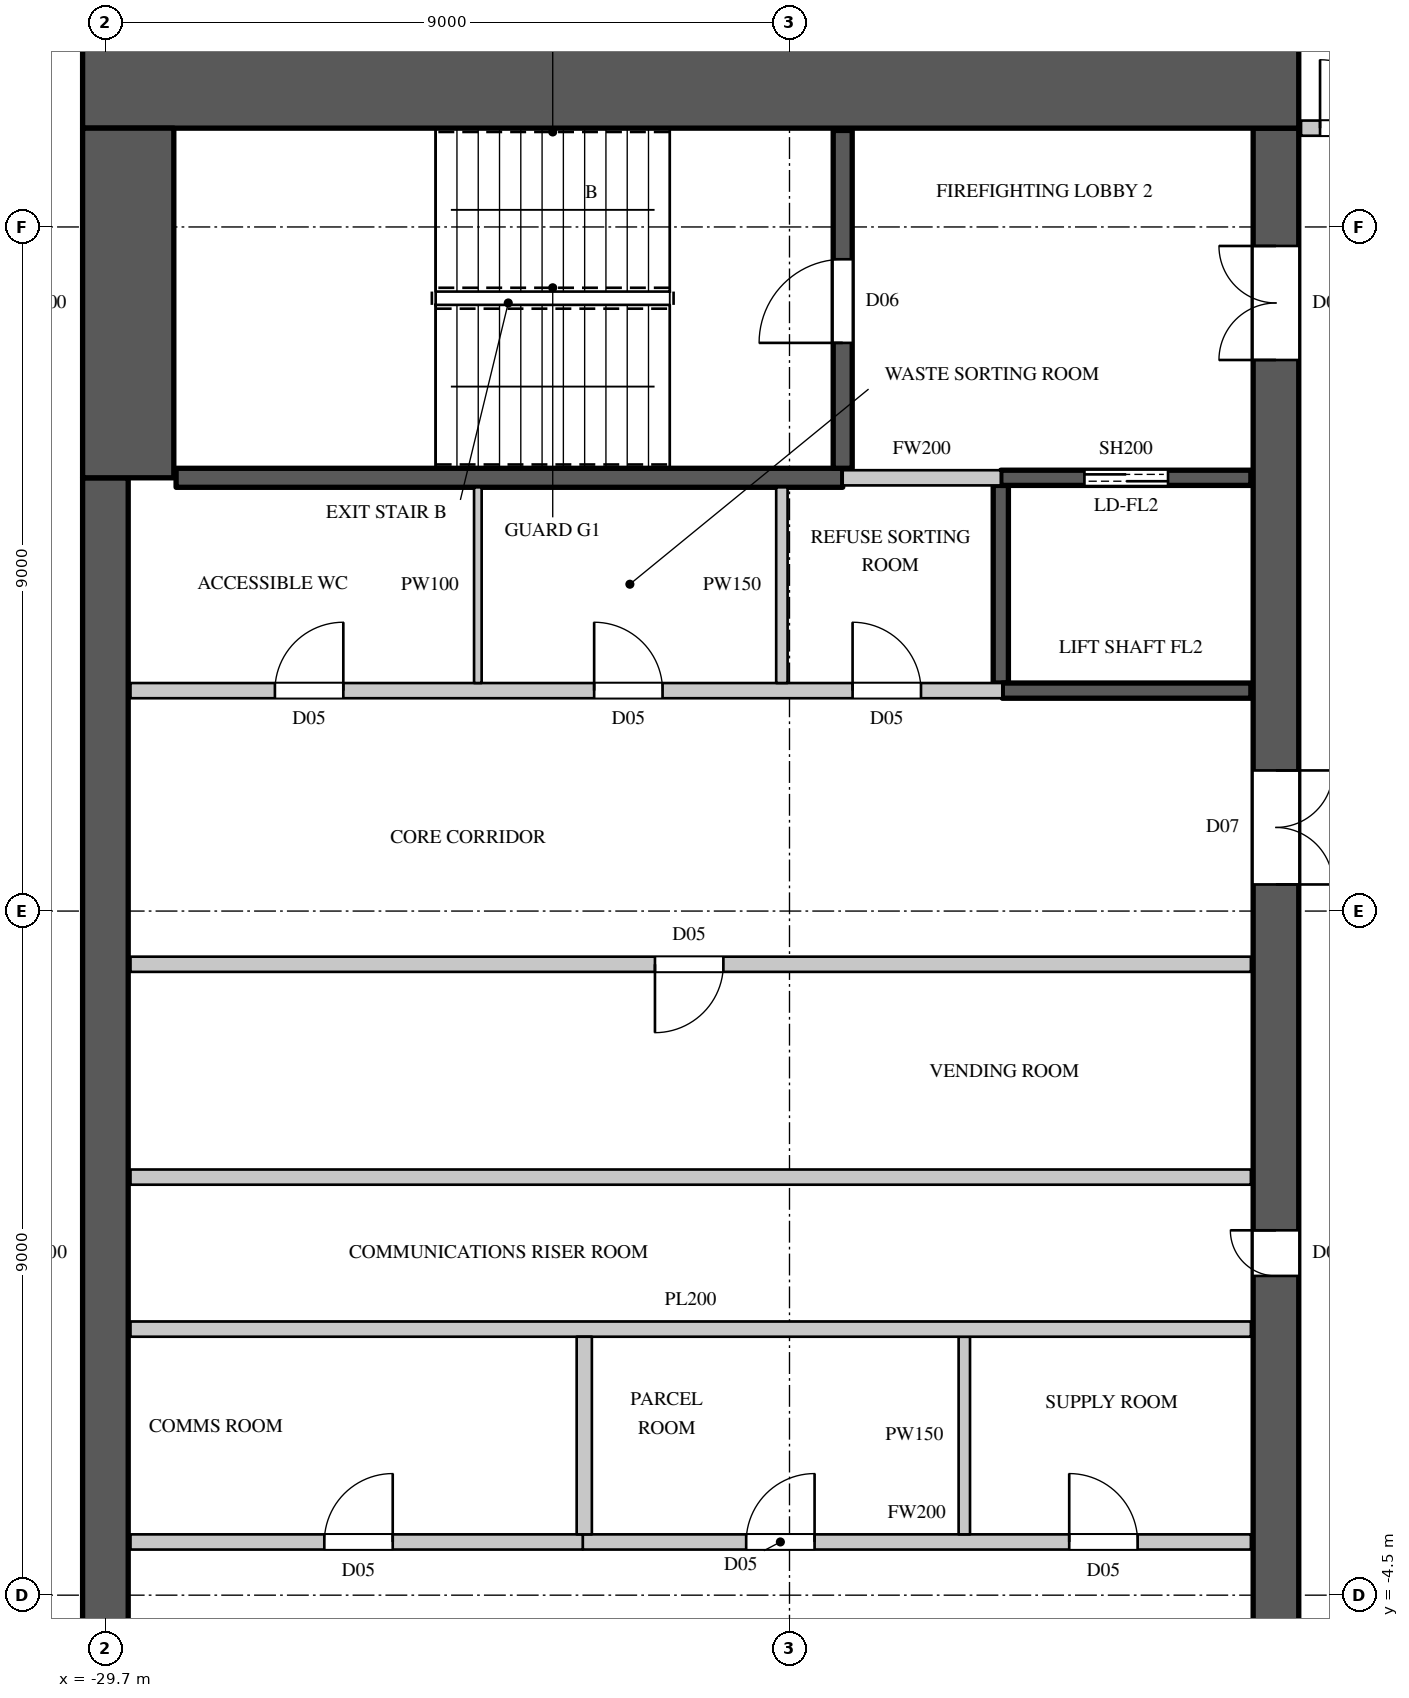
"""IFC4 building model, lengths in metres.
Left out: names, types, materials, properties, quantities, classifications, styles, units other than length and angle.
Written with IfcOpenShell. Run it as: python <this file> out.ifc"""

import sys

from ifc_helpers import new_model, si_unit, direction, frame, frame_2d, origin, place, context, subcontext, project, spatial, rectangle, extrude, element, fill, save


model = new_model("IFC4")
c1 = context("Model", 3, precision=1e-05, world=origin(), true_north=direction((0.0, 1.0)))
c2 = subcontext(c1, "Body", "Model", "MODEL_VIEW")
j1 = project(units=[si_unit("LENGTHUNIT", "METRE"), si_unit("PLANEANGLEUNIT", "RADIAN")], contexts=[c1])
p1 = place(None, origin())
s1 = spatial("IfcSite", under=j1, at=p1, CompositionType="ELEMENT")
p2 = place(p1, origin())
s2 = spatial("IfcBuilding", under=s1, at=p2, CompositionType="ELEMENT")
p3 = place(p2, frame((0.0, 0.0, 347.0)))
s3 = spatial("IfcBuildingStorey", under=s2, at=p3, CompositionType="ELEMENT", Elevation=347.0)
p4 = place(p3, frame((-30.0, 15.4, 0.0), z_axis=(0.0, 0.0, 1.0), x_axis=(1.0, 0.0, 0.0)))
e1 = element("IfcWall", 1, at=p4, inside=s3, PredefinedType="SHEAR", context=c2, shape_type="SweptSolid", body=[
    extrude(rectangle(XDim=16.0, YDim=1.2, at=frame_2d((8.0, 0.0))), origin(), (0.0, 0.0, 1.0), 4.0),
])
p5 = place(p3, frame((-14.3, -14.8, 0.0), z_axis=(0.0, 0.0, 1.0), x_axis=(0.0, 1.0, 0.0)))
e2 = element("IfcWall", 2, at=p5, inside=s3, PredefinedType="SHEAR", context=c2, shape_type="SweptSolid", body=[
    extrude(rectangle(XDim=29.6, YDim=0.6, at=frame_2d((14.8, 0.0))), origin(), (0.0, 0.0, 1.0), 4.0),
])
p6 = place(p5, frame((1.55, 0.0, 0.0)))
e3 = element("IfcOpeningElement", 3, at=p6, cuts=e2, PredefinedType="OPENING", context=c2, shape_type="SweptSolid", body=[
    extrude(rectangle(XDim=1.5, YDim=2.4, at=frame_2d((0.75, 1.2))), frame((0.0, 0.31, 0.0), z_axis=(0.0, -1.0, 0.0), x_axis=(1.0, 0.0, 0.0)), (0.0, 0.0, 1.0), 0.62),
])
p7 = place(p5, frame((26.55, 0.0, 0.0)))
e4 = element("IfcOpeningElement", 4, at=p7, cuts=e2, PredefinedType="OPENING", context=c2, shape_type="SweptSolid", body=[
    extrude(rectangle(XDim=1.5, YDim=2.4, at=frame_2d((0.75, 1.2))), frame((0.0, 0.31, 0.0), z_axis=(0.0, -1.0, 0.0), x_axis=(1.0, 0.0, 0.0)), (0.0, 0.0, 1.0), 0.62),
])
p8 = place(p5, frame((8.45, 0.0, 0.0)))
e5 = element("IfcOpeningElement", 5, at=p8, cuts=e2, PredefinedType="OPENING", context=c2, shape_type="SweptSolid", body=[
    extrude(rectangle(XDim=1.5, YDim=2.4, at=frame_2d((0.75, 1.2))), frame((0.0, 0.31, 0.0), z_axis=(0.0, -1.0, 0.0), x_axis=(1.0, 0.0, 0.0)), (0.0, 0.0, 1.0), 0.62),
])
p9 = place(p5, frame((19.65, 0.0, 0.0)))
e6 = element("IfcOpeningElement", 6, at=p9, cuts=e2, PredefinedType="OPENING", context=c2, shape_type="SweptSolid", body=[
    extrude(rectangle(XDim=1.5, YDim=2.4, at=frame_2d((0.75, 1.2))), frame((0.0, 0.31, 0.0), z_axis=(0.0, -1.0, 0.0), x_axis=(1.0, 0.0, 0.0)), (0.0, 0.0, 1.0), 0.62),
])
p10 = place(p5, frame((14.5, 0.0, 0.0)))
e7 = element("IfcOpeningElement", 7, at=p10, cuts=e2, PredefinedType="OPENING", context=c2, shape_type="SweptSolid", body=[
    extrude(rectangle(XDim=0.6, YDim=2.0, at=frame_2d((0.3, 1.0))), frame((0.0, 0.31, 0.0), z_axis=(0.0, -1.0, 0.0), x_axis=(1.0, 0.0, 0.0)), (0.0, 0.0, 1.0), 0.62),
])
p11 = place(p3, frame((-29.7, -10.2, 0.0), z_axis=(0.0, 0.0, 1.0), x_axis=(0.0, 1.0, 0.0)))
e8 = element("IfcWall", 8, at=p11, inside=s3, PredefinedType="SHEAR", context=c2, shape_type="SweptSolid", body=[
    extrude(rectangle(XDim=20.4, YDim=0.6, at=frame_2d((10.2, 0.0))), origin(), (0.0, 0.0, 1.0), 4.0),
])
p12 = place(p3, frame((-29.4, 10.2, 0.0), z_axis=(0.0, 0.0, 1.0), x_axis=(0.0, 1.0, 0.0)))
e9 = element("IfcWall", 9, at=p12, inside=s3, PredefinedType="SHEAR", context=c2, shape_type="SweptSolid", body=[
    extrude(rectangle(XDim=4.6, YDim=1.2, at=frame_2d((2.3, 0.0))), origin(), (0.0, 0.0, 1.0), 4.0),
])
p13 = place(p3, frame((-29.37, 3.8, 0.0), z_axis=(0.0, 0.0, 1.0), x_axis=(1.0, 0.0, 0.0)))
e10 = element("IfcWall", 10, at=p13, inside=s3, PredefinedType="PARTITIONING", context=c2, shape_type="SweptSolid", body=[
    extrude(rectangle(XDim=14.74, YDim=0.2, at=frame_2d((7.37, 0.0))), origin(), (0.0, 0.0, 1.0), 3.598),
])
p14 = place(p13, frame((6.9, 0.0, 0.0)))
e11 = element("IfcOpeningElement", 11, at=p14, cuts=e10, PredefinedType="OPENING", context=c2, shape_type="SweptSolid", body=[
    extrude(rectangle(XDim=0.9, YDim=2.2, at=frame_2d((0.45, 1.1))), frame((0.0, 0.11, 0.0), z_axis=(0.0, -1.0, 0.0), x_axis=(1.0, 0.0, 0.0)), (0.0, 0.0, 1.0), 0.22),
])
p15 = place(p3, frame((-29.37, 7.4, 0.0), z_axis=(0.0, 0.0, 1.0), x_axis=(1.0, 0.0, 0.0)))
e12 = element("IfcWall", 12, at=p15, inside=s3, PredefinedType="PARTITIONING", context=c2, shape_type="SweptSolid", body=[
    extrude(rectangle(XDim=11.47, YDim=0.2, at=frame_2d((5.735, 0.0))), origin(), (0.0, 0.0, 1.0), 3.598),
])
p16 = place(p15, frame((1.9, 0.0, 0.0)))
e13 = element("IfcOpeningElement", 13, at=p16, cuts=e12, PredefinedType="OPENING", context=c2, shape_type="SweptSolid", body=[
    extrude(rectangle(XDim=0.9, YDim=2.2, at=frame_2d((0.45, 1.1))), frame((0.0, 0.11, 0.0), z_axis=(0.0, -1.0, 0.0), x_axis=(1.0, 0.0, 0.0)), (0.0, 0.0, 1.0), 0.22),
])
p17 = place(p15, frame((6.1, 0.0, 0.0)))
e14 = element("IfcOpeningElement", 14, at=p17, cuts=e12, PredefinedType="OPENING", context=c2, shape_type="SweptSolid", body=[
    extrude(rectangle(XDim=0.9, YDim=2.2, at=frame_2d((0.45, 1.1))), frame((0.0, 0.11, 0.0), z_axis=(0.0, -1.0, 0.0), x_axis=(1.0, 0.0, 0.0)), (0.0, 0.0, 1.0), 0.22),
])
p18 = place(p15, frame((9.5, 0.0, 0.0)))
e15 = element("IfcOpeningElement", 15, at=p18, cuts=e12, PredefinedType="OPENING", context=c2, shape_type="SweptSolid", body=[
    extrude(rectangle(XDim=0.9, YDim=2.2, at=frame_2d((0.45, 1.1))), frame((0.0, 0.11, 0.0), z_axis=(0.0, -1.0, 0.0), x_axis=(1.0, 0.0, 0.0)), (0.0, 0.0, 1.0), 0.22),
])
p19 = place(p3, frame((-23.42, -3.8, 0.0), z_axis=(0.0, 0.0, 1.0), x_axis=(1.0, 0.0, 0.0)))
e16 = element("IfcWall", 16, at=p19, inside=s3, PredefinedType="PARTITIONING", context=c2, shape_type="SweptSolid", body=[
    extrude(rectangle(XDim=8.79, YDim=0.2, at=frame_2d((4.395, 0.0))), origin(), (0.0, 0.0, 1.0), 3.598),
])
p20 = place(p19, frame((2.15, 0.0, 0.0)))
e17 = element("IfcOpeningElement", 17, at=p20, cuts=e16, PredefinedType="OPENING", context=c2, shape_type="SweptSolid", body=[
    extrude(rectangle(XDim=0.9, YDim=2.2, at=frame_2d((0.45, 1.1))), frame((0.0, 0.11, 0.0), z_axis=(0.0, -1.0, 0.0), x_axis=(1.0, 0.0, 0.0)), (0.0, 0.0, 1.0), 0.22),
])
p21 = place(p19, frame((6.4, 0.0, 0.0)))
e18 = element("IfcOpeningElement", 18, at=p21, cuts=e16, PredefinedType="OPENING", context=c2, shape_type="SweptSolid", body=[
    extrude(rectangle(XDim=0.9, YDim=2.2, at=frame_2d((0.45, 1.1))), frame((0.0, 0.11, 0.0), z_axis=(0.0, -1.0, 0.0), x_axis=(1.0, 0.0, 0.0)), (0.0, 0.0, 1.0), 0.22),
])
p22 = place(p3, frame((-20.0, 10.2, 0.0), z_axis=(0.0, 0.0, 1.0), x_axis=(1.0, 0.0, 0.0)))
e19 = element("IfcWall", 19, at=p22, inside=s3, PredefinedType="PARTITIONING", context=c2, shape_type="SweptSolid", body=[
    extrude(rectangle(XDim=2.08, YDim=0.2, at=frame_2d((1.04, 0.0))), origin(), (0.0, 0.0, 1.0), 3.598),
])
p23 = place(p3, frame((-20.8, 7.5, 0.0), z_axis=(0.0, 0.0, 1.0), x_axis=(0.0, 1.0, 0.0)))
e20 = element("IfcWall", 20, at=p23, inside=s3, PredefinedType="PARTITIONING", context=c2, shape_type="SweptSolid", body=[
    extrude(rectangle(XDim=2.575, YDim=0.15, at=frame_2d((1.288, 0.0))), origin(), (0.0, 0.0, 1.0), 3.598),
])
p24 = place(p3, frame((-18.4, -3.7, 0.0), z_axis=(0.0, 0.0, 1.0), x_axis=(0.0, 1.0, 0.0)))
e21 = element("IfcWall", 21, at=p24, inside=s3, PredefinedType="PARTITIONING", context=c2, shape_type="SweptSolid", body=[
    extrude(rectangle(XDim=2.6, YDim=0.15, at=frame_2d((1.3, 0.0))), origin(), (0.0, 0.0, 1.0), 3.598),
])
p25 = place(p3, frame((-29.37, -3.8, 0.0), z_axis=(0.0, 0.0, 1.0), x_axis=(1.0, 0.0, 0.0)))
e22 = element("IfcWall", 22, at=p25, inside=s3, PredefinedType="PARTITIONING", context=c2, shape_type="SweptSolid", body=[
    extrude(rectangle(XDim=5.95, YDim=0.2, at=frame_2d((2.975, 0.0))), origin(), (0.0, 0.0, 1.0), 3.598),
])
p26 = place(p25, frame((2.55, 0.0, 0.0)))
e23 = element("IfcOpeningElement", 23, at=p26, cuts=e22, PredefinedType="OPENING", context=c2, shape_type="SweptSolid", body=[
    extrude(rectangle(XDim=0.9, YDim=2.2, at=frame_2d((0.45, 1.1))), frame((0.0, 0.11, 0.0), z_axis=(0.0, -1.0, 0.0), x_axis=(1.0, 0.0, 0.0)), (0.0, 0.0, 1.0), 0.22),
])
for number, where, z_axis, x_axis in (
    (24, (-29.37, -1.0, 0.0), (0.0, 0.0, 1.0), (1.0, 0.0, 0.0)),
    (25, (-29.37, 1.0, 0.0), (0.0, 0.0, 1.0), (1.0, 0.0, 0.0)),
):
    element("IfcWall", number, at=place(p3, frame(where, z_axis=z_axis, x_axis=x_axis)), inside=s3, PredefinedType="PARTITIONING", context=c2, shape_type="SweptSolid", body=[
        extrude(rectangle(XDim=14.74, YDim=0.2, at=frame_2d((7.37, 0.0))), origin(), (0.0, 0.0, 1.0), 3.598),
    ])
p27 = place(p3, frame((-23.4, -3.7, 0.0), z_axis=(0.0, 0.0, 1.0), x_axis=(0.0, 1.0, 0.0)))
e26 = element("IfcWall", 26, at=p27, inside=s3, PredefinedType="PARTITIONING", context=c2, shape_type="SweptSolid", body=[
    extrude(rectangle(XDim=2.6, YDim=0.2, at=frame_2d((1.3, 0.0))), origin(), (0.0, 0.0, 1.0), 3.598),
])
p28 = place(p3, frame((-13.97, 14.8, 0.0), z_axis=(0.0, 0.0, 1.0), x_axis=(1.0, 0.0, 0.0)))
e27 = element("IfcWall", 27, at=p28, inside=s3, PredefinedType="PARTITIONING", context=c2, shape_type="SweptSolid", body=[
    extrude(rectangle(XDim=2.27, YDim=0.2, at=frame_2d((1.135, 0.0))), origin(), (0.0, 0.0, 1.0), 3.598),
])
p29 = place(p28, frame((0.25, 0.0, 0.0)))
e28 = element("IfcOpeningElement", 28, at=p29, cuts=e27, PredefinedType="OPENING", context=c2, shape_type="SweptSolid", body=[
    extrude(rectangle(XDim=1.8, YDim=2.4, at=frame_2d((0.9, 1.2))), frame((0.0, 0.11, 0.0), z_axis=(0.0, -1.0, 0.0), x_axis=(1.0, 0.0, 0.0)), (0.0, 0.0, 1.0), 0.22),
])
p30 = place(p3, frame((-17.92, 7.5, 0.0), z_axis=(0.0, 0.0, 1.0), x_axis=(0.0, 1.0, 0.0)))
e29 = element("IfcWall", 29, at=p30, inside=s3, PredefinedType="SHEAR", context=c2, shape_type="SweptSolid", body=[
    extrude(rectangle(XDim=2.6, YDim=0.2, at=frame_2d((1.3, 0.0))), origin(), (0.0, 0.0, 1.0), 3.598),
])
p31 = place(p3, frame((-17.9, 7.4, 0.0), z_axis=(0.0, 0.0, 1.0), x_axis=(1.0, 0.0, 0.0)))
e30 = element("IfcWall", 30, at=p31, inside=s3, PredefinedType="SHEAR", context=c2, shape_type="SweptSolid", body=[
    extrude(rectangle(XDim=3.27, YDim=0.2, at=frame_2d((1.635, 0.0))), origin(), (0.0, 0.0, 1.0), 3.598),
])
p32 = place(p3, frame((-17.92, 10.2, 0.0), z_axis=(0.0, 0.0, 1.0), x_axis=(1.0, 0.0, 0.0)))
e31 = element("IfcWall", 31, at=p32, inside=s3, PredefinedType="SHEAR", context=c2, shape_type="SweptSolid", body=[
    extrude(rectangle(XDim=3.29, YDim=0.2, at=frame_2d((1.645, 0.0))), origin(), (0.0, 0.0, 1.0), 3.598),
])
p33 = place(p32, frame((1.1, 0.0, 0.0)))
e32 = element("IfcOpeningElement", 32, at=p33, cuts=e31, PredefinedType="OPENING", context=c2, shape_type="SweptSolid", body=[
    extrude(rectangle(XDim=1.1, YDim=2.2, at=frame_2d((0.55, 1.1))), frame((0.0, 0.11, 0.0), z_axis=(0.0, -1.0, 0.0), x_axis=(1.0, 0.0, 0.0)), (0.0, 0.0, 1.0), 0.22),
])
p34 = place(p3, frame((-28.77, 10.2, 0.0), z_axis=(0.0, 0.0, 1.0), x_axis=(1.0, 0.0, 0.0)))
e33 = element("IfcWall", 33, at=p34, inside=s3, PredefinedType="SHEAR", context=c2, shape_type="SweptSolid", body=[
    extrude(rectangle(XDim=8.77, YDim=0.25, at=frame_2d((4.385, 0.0))), origin(), (0.0, 0.0, 1.0), 3.598),
])
p35 = place(p3, frame((-20.0, 10.325, 0.0), z_axis=(0.0, 0.0, 1.0), x_axis=(0.0, 1.0, 0.0)))
e34 = element("IfcWall", 34, at=p35, inside=s3, PredefinedType="SHEAR", context=c2, shape_type="SweptSolid", body=[
    extrude(rectangle(XDim=4.445, YDim=0.25, at=frame_2d((2.223, 0.0))), origin(), (0.0, 0.0, 1.0), 3.598),
])
p36 = place(p35, frame((1.65, 0.0, 0.0)))
e35 = element("IfcOpeningElement", 35, at=p36, cuts=e34, PredefinedType="OPENING", context=c2, shape_type="SweptSolid", body=[
    extrude(rectangle(XDim=1.1, YDim=2.2, at=frame_2d((0.55, 1.1))), frame((0.0, 0.135, 0.0), z_axis=(0.0, -1.0, 0.0), x_axis=(1.0, 0.0, 0.0)), (0.0, 0.0, 1.0), 0.27),
])
p37 = place(p3, frame((-24.8, 7.5, 0.0), z_axis=(0.0, 0.0, 1.0), x_axis=(0.0, 1.0, 0.0)))
e36 = element("IfcWall", 36, at=p37, inside=s3, PredefinedType="PARTITIONING", context=c2, shape_type="SweptSolid", body=[
    extrude(rectangle(XDim=2.575, YDim=0.1, at=frame_2d((1.288, 0.0))), origin(), (0.0, 0.0, 1.0), 3.598),
])
p38 = place(p36, origin())
e37 = element("IfcDoor", 37, at=p38, inside=s3, OperationType="SINGLE_SWING_LEFT", PredefinedType="DOOR", context=c2, shape_type="SweptSolid", body=[
    extrude(rectangle(XDim=1.1, YDim=2.2, at=frame_2d((0.55, 1.1))), frame((0.0, 0.025, 0.0), z_axis=(0.0, -1.0, 0.0), x_axis=(1.0, 0.0, 0.0)), (0.0, 0.0, 1.0), 0.05),
])
fill(e35, e37)
p39 = place(p26, origin())
e38 = element("IfcDoor", 38, at=p39, inside=s3, OperationType="SINGLE_SWING_RIGHT", PredefinedType="DOOR", context=c2, shape_type="SweptSolid", body=[
    extrude(rectangle(XDim=0.9, YDim=2.2, at=frame_2d((0.45, 1.1))), frame((0.0, 0.025, 0.0), z_axis=(0.0, -1.0, 0.0), x_axis=(1.0, 0.0, 0.0)), (0.0, 0.0, 1.0), 0.05),
])
fill(e23, e38)
p40 = place(p20, origin())
e39 = element("IfcDoor", 39, at=p40, inside=s3, OperationType="SINGLE_SWING_RIGHT", PredefinedType="DOOR", context=c2, shape_type="SweptSolid", body=[
    extrude(rectangle(XDim=0.9, YDim=2.2, at=frame_2d((0.45, 1.1))), frame((0.0, 0.025, 0.0), z_axis=(0.0, -1.0, 0.0), x_axis=(1.0, 0.0, 0.0)), (0.0, 0.0, 1.0), 0.05),
])
fill(e17, e39)
p41 = place(p21, origin())
e40 = element("IfcDoor", 40, at=p41, inside=s3, OperationType="SINGLE_SWING_LEFT", PredefinedType="DOOR", context=c2, shape_type="SweptSolid", body=[
    extrude(rectangle(XDim=0.9, YDim=2.2, at=frame_2d((0.45, 1.1))), frame((0.0, 0.025, 0.0), z_axis=(0.0, -1.0, 0.0), x_axis=(1.0, 0.0, 0.0)), (0.0, 0.0, 1.0), 0.05),
])
fill(e18, e40)
p42 = place(p14, origin())
e41 = element("IfcDoor", 41, at=p42, inside=s3, OperationType="SINGLE_SWING_RIGHT", PredefinedType="DOOR", context=c2, shape_type="SweptSolid", body=[
    extrude(rectangle(XDim=0.9, YDim=2.2, at=frame_2d((0.45, 1.1))), frame((0.0, 0.025, 0.0), z_axis=(0.0, -1.0, 0.0), x_axis=(1.0, 0.0, 0.0)), (0.0, 0.0, 1.0), 0.05),
])
fill(e11, e41)
p43 = place(p16, origin())
e42 = element("IfcDoor", 42, at=p43, inside=s3, OperationType="SINGLE_SWING_RIGHT", PredefinedType="DOOR", context=c2, shape_type="SweptSolid", body=[
    extrude(rectangle(XDim=0.9, YDim=2.2, at=frame_2d((0.45, 1.1))), frame((0.0, 0.025, 0.0), z_axis=(0.0, -1.0, 0.0), x_axis=(1.0, 0.0, 0.0)), (0.0, 0.0, 1.0), 0.05),
])
fill(e13, e42)
p44 = place(p17, origin())
e43 = element("IfcDoor", 43, at=p44, inside=s3, OperationType="SINGLE_SWING_LEFT", PredefinedType="DOOR", context=c2, shape_type="SweptSolid", body=[
    extrude(rectangle(XDim=0.9, YDim=2.2, at=frame_2d((0.45, 1.1))), frame((0.0, 0.025, 0.0), z_axis=(0.0, -1.0, 0.0), x_axis=(1.0, 0.0, 0.0)), (0.0, 0.0, 1.0), 0.05),
])
fill(e14, e43)
p45 = place(p18, origin())
e44 = element("IfcDoor", 44, at=p45, inside=s3, OperationType="SINGLE_SWING_LEFT", PredefinedType="DOOR", context=c2, shape_type="SweptSolid", body=[
    extrude(rectangle(XDim=0.9, YDim=2.2, at=frame_2d((0.45, 1.1))), frame((0.0, 0.025, 0.0), z_axis=(0.0, -1.0, 0.0), x_axis=(1.0, 0.0, 0.0)), (0.0, 0.0, 1.0), 0.05),
])
fill(e15, e44)
p46 = place(p33, origin())
e45 = element("IfcDoor", 45, at=p46, inside=s3, OperationType="DOUBLE_DOOR_SLIDING", PredefinedType="DOOR", context=c2, shape_type="SweptSolid", body=[
    extrude(rectangle(XDim=1.1, YDim=2.2, at=frame_2d((0.55, 1.1))), frame((0.0, 0.025, 0.0), z_axis=(0.0, -1.0, 0.0), x_axis=(1.0, 0.0, 0.0)), (0.0, 0.0, 1.0), 0.05),
])
fill(e32, e45)
p47 = place(p29, origin())
e46 = element("IfcDoor", 46, at=p47, inside=s3, OperationType="DOUBLE_DOOR_SINGLE_SWING", PredefinedType="DOOR", context=c2, shape_type="SweptSolid", body=[
    extrude(rectangle(XDim=1.8, YDim=2.4, at=frame_2d((0.9, 1.2))), frame((0.0, 0.025, 0.0), z_axis=(0.0, -1.0, 0.0), x_axis=(1.0, 0.0, 0.0)), (0.0, 0.0, 1.0), 0.05),
])
fill(e28, e46)
p48 = place(p7, origin())
e47 = element("IfcDoor", 47, at=p48, inside=s3, OperationType="DOUBLE_DOOR_SINGLE_SWING", PredefinedType="DOOR", context=c2, shape_type="SweptSolid", body=[
    extrude(rectangle(XDim=1.5, YDim=2.4, at=frame_2d((0.75, 1.2))), frame((0.0, 0.295, 0.0), z_axis=(0.0, -1.0, 0.0), x_axis=(1.0, 0.0, 0.0)), (0.0, 0.0, 1.0), 0.05),
])
fill(e4, e47)
p49 = place(p9, origin())
e48 = element("IfcDoor", 48, at=p49, inside=s3, OperationType="DOUBLE_DOOR_SINGLE_SWING", PredefinedType="DOOR", context=c2, shape_type="SweptSolid", body=[
    extrude(rectangle(XDim=1.5, YDim=2.4, at=frame_2d((0.75, 1.2))), frame((0.0, -0.245, 0.0), z_axis=(0.0, -1.0, 0.0), x_axis=(1.0, 0.0, 0.0)), (0.0, 0.0, 1.0), 0.05),
])
fill(e6, e48)
p50 = place(p10, origin())
e49 = element("IfcDoor", 49, at=p50, inside=s3, OperationType="SINGLE_SWING_RIGHT", PredefinedType="DOOR", context=c2, shape_type="SweptSolid", body=[
    extrude(rectangle(XDim=0.6, YDim=2.0, at=frame_2d((0.3, 1.0))), frame((0.0, 0.295, 0.0), z_axis=(0.0, -1.0, 0.0), x_axis=(1.0, 0.0, 0.0)), (0.0, 0.0, 1.0), 0.05),
])
fill(e7, e49)
save(model, sys.argv[1])
